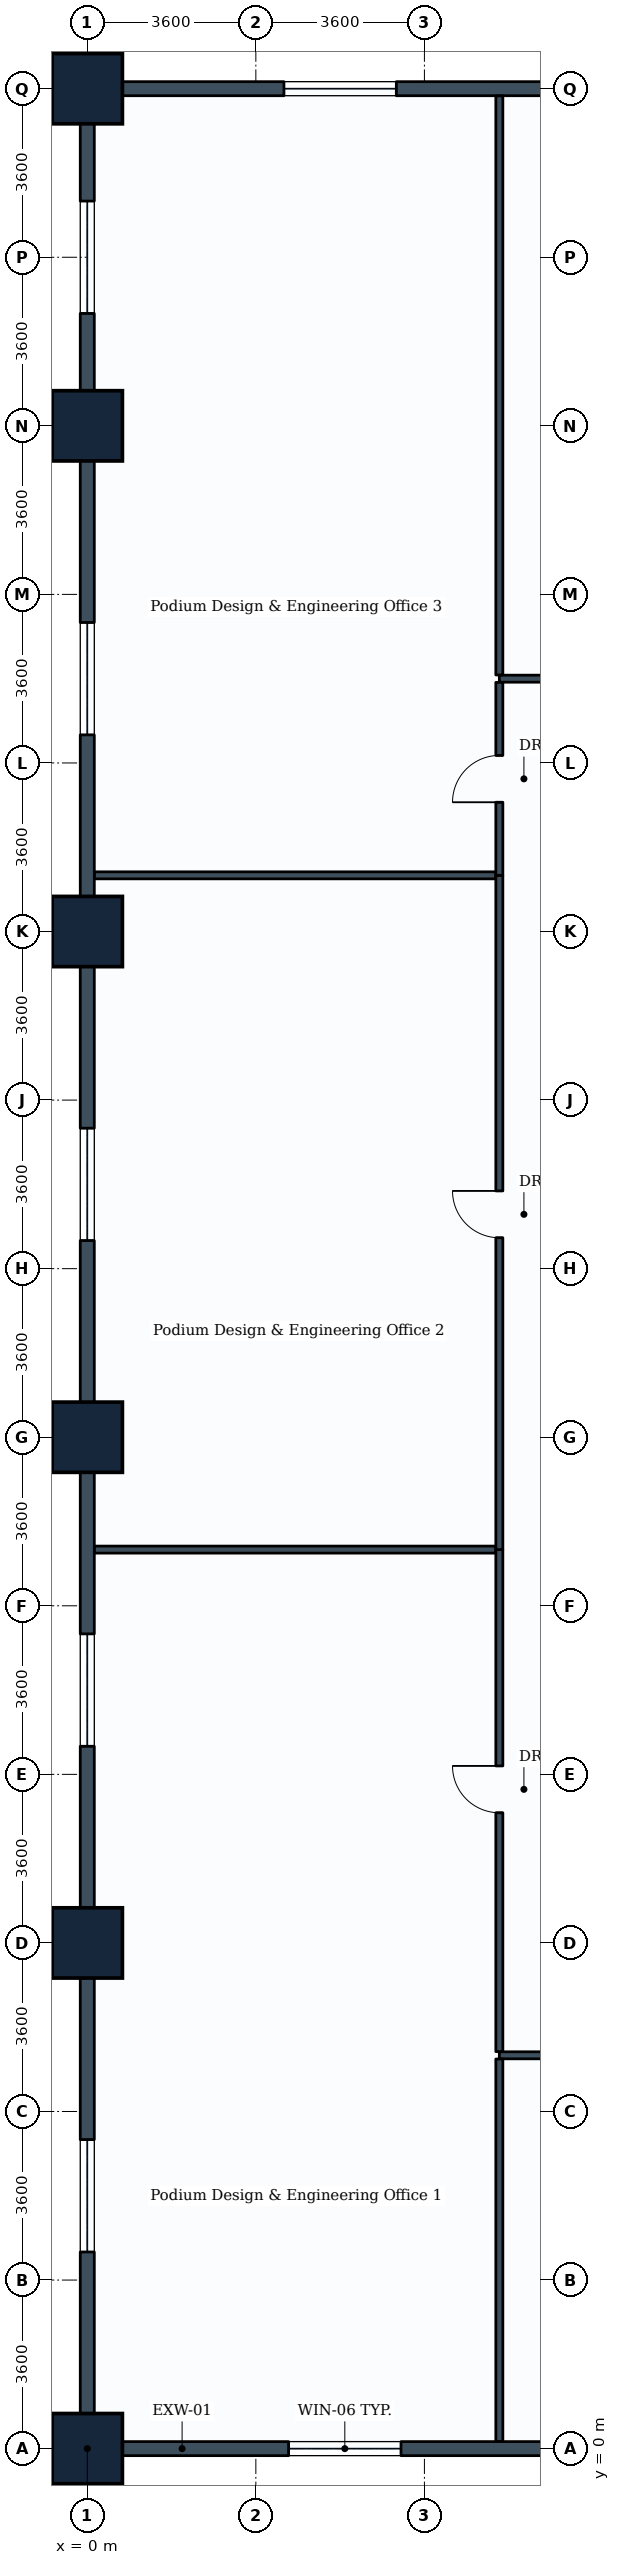
"""IFC4 building model, lengths in metres.
Left out: names, types, materials, properties, quantities, classifications, styles, units other than length and angle.
Written with IfcOpenShell. Run it as: python <this file> out.ifc"""

import sys

from ifc_helpers import new_model, si_unit, direction, frame, frame_2d, origin, origin_2d, place, context, subcontext, project, spatial, rectangle, extrude, element, fill, save


model = new_model("IFC4")
c1 = context("Model", 3, precision=1e-05, world=origin(), true_north=direction((0.0, 1.0)))
c2 = subcontext(c1, "Body", "Model", "MODEL_VIEW")
j1 = project(units=[si_unit("LENGTHUNIT", "METRE"), si_unit("PLANEANGLEUNIT", "RADIAN")], contexts=[c1])
p1 = place(None, origin())
s1 = spatial("IfcSite", under=j1, at=p1, CompositionType="ELEMENT")
p2 = place(p1, origin())
s2 = spatial("IfcBuilding", under=s1, at=p2, CompositionType="ELEMENT")
p3 = place(p2, frame((0.0, 0.0, 10.2)))
s3 = spatial("IfcBuildingStorey", under=s2, at=p3, CompositionType="ELEMENT", Elevation=10.2)
for number, where, z_axis, x_axis in (
    (1, (0.0, 0.0, 0.0), (0.0, 0.0, 1.0), (1.0, 0.0, 0.0)),
    (2, (0.0, 10.8, 0.0), (0.0, 0.0, 1.0), (1.0, 0.0, 0.0)),
    (3, (0.0, 21.6, 0.0), (0.0, 0.0, 1.0), (1.0, 0.0, 0.0)),
    (4, (0.0, 32.4, 0.0), (0.0, 0.0, 1.0), (1.0, 0.0, 0.0)),
    (5, (0.0, 43.2, 0.0), (0.0, 0.0, 1.0), (1.0, 0.0, 0.0)),
    (6, (0.0, 50.4, 0.0), (0.0, 0.0, 1.0), (1.0, 0.0, 0.0)),
):
    element("IfcColumn", number, at=place(p3, frame(where, z_axis=z_axis, x_axis=x_axis)), inside=s3, PredefinedType="COLUMN", context=c2, shape_type="SweptSolid", body=[
        extrude(rectangle(XDim=1.5, YDim=1.5, at=origin_2d()), origin(), (0.0, 0.0, 1.0), 4.6),
    ])
p4 = place(p3, frame((10.8, 0.0, 0.0), z_axis=(0.0, 0.0, 1.0), x_axis=(-1.0, 0.0, 0.0)))
e7 = element("IfcWall", 7, at=p4, inside=s3, PredefinedType="STANDARD", context=c2, shape_type="SweptSolid", body=[
    extrude(rectangle(XDim=10.8, YDim=0.3, at=frame_2d((5.4, 0.0))), origin(), (0.0, 0.0, 1.0), 3.23),
])
p5 = place(p4, frame((4.1, 0.0, 0.85)))
e8 = element("IfcOpeningElement", 8, at=p5, cuts=e7, PredefinedType="OPENING", context=c2, shape_type="SweptSolid", body=[
    extrude(rectangle(XDim=2.4, YDim=1.6, at=frame_2d((1.2, 0.8))), frame((0.0, 0.16, 0.0), z_axis=(0.0, -1.0, 0.0), x_axis=(1.0, 0.0, 0.0)), (0.0, 0.0, 1.0), 0.32),
])
p6 = place(p3, frame((0.0, 50.4, 0.0), z_axis=(0.0, 0.0, 1.0), x_axis=(1.0, 0.0, 0.0)))
e9 = element("IfcWall", 9, at=p6, inside=s3, PredefinedType="STANDARD", context=c2, shape_type="SweptSolid", body=[
    extrude(rectangle(XDim=10.8, YDim=0.3, at=frame_2d((5.4, 0.0))), origin(), (0.0, 0.0, 1.0), 3.63),
])
p7 = place(p6, frame((4.2, 0.0, 0.85)))
e10 = element("IfcOpeningElement", 10, at=p7, cuts=e9, PredefinedType="OPENING", context=c2, shape_type="SweptSolid", body=[
    extrude(rectangle(XDim=2.4, YDim=1.6, at=frame_2d((1.2, 0.8))), frame((0.0, 0.16, 0.0), z_axis=(0.0, -1.0, 0.0), x_axis=(1.0, 0.0, 0.0)), (0.0, 0.0, 1.0), 0.32),
])
p8 = place(p3, frame((0.0, 0.0, 0.0), z_axis=(0.0, 0.0, 1.0), x_axis=(0.0, 1.0, 0.0)))
e11 = element("IfcWall", 11, at=p8, inside=s3, PredefinedType="STANDARD", context=c2, shape_type="SweptSolid", body=[
    extrude(rectangle(XDim=10.8, YDim=0.3, at=frame_2d((5.4, 0.0))), origin(), (0.0, 0.0, 1.0), 3.23),
])
p9 = place(p8, frame((4.2, 0.0, 0.85)))
e12 = element("IfcOpeningElement", 12, at=p9, cuts=e11, PredefinedType="OPENING", context=c2, shape_type="SweptSolid", body=[
    extrude(rectangle(XDim=2.4, YDim=1.6, at=frame_2d((1.2, 0.8))), frame((0.0, 0.16, 0.0), z_axis=(0.0, -1.0, 0.0), x_axis=(1.0, 0.0, 0.0)), (0.0, 0.0, 1.0), 0.32),
])
p10 = place(p3, frame((0.0, 10.8, 0.0), z_axis=(0.0, 0.0, 1.0), x_axis=(0.0, 1.0, 0.0)))
e13 = element("IfcWall", 13, at=p10, inside=s3, PredefinedType="STANDARD", context=c2, shape_type="SweptSolid", body=[
    extrude(rectangle(XDim=10.8, YDim=0.3, at=frame_2d((5.4, 0.0))), origin(), (0.0, 0.0, 1.0), 3.63),
])
p11 = place(p10, frame((4.2, 0.0, 0.85)))
e14 = element("IfcOpeningElement", 14, at=p11, cuts=e13, PredefinedType="OPENING", context=c2, shape_type="SweptSolid", body=[
    extrude(rectangle(XDim=2.4, YDim=1.6, at=frame_2d((1.2, 0.8))), frame((0.0, 0.16, 0.0), z_axis=(0.0, -1.0, 0.0), x_axis=(1.0, 0.0, 0.0)), (0.0, 0.0, 1.0), 0.32),
])
p12 = place(p3, frame((0.0, 21.6, 0.0), z_axis=(0.0, 0.0, 1.0), x_axis=(0.0, 1.0, 0.0)))
e15 = element("IfcWall", 15, at=p12, inside=s3, PredefinedType="STANDARD", context=c2, shape_type="SweptSolid", body=[
    extrude(rectangle(XDim=10.8, YDim=0.3, at=frame_2d((5.4, 0.0))), origin(), (0.0, 0.0, 1.0), 3.63),
])
p13 = place(p12, frame((4.2, 0.0, 0.85)))
e16 = element("IfcOpeningElement", 16, at=p13, cuts=e15, PredefinedType="OPENING", context=c2, shape_type="SweptSolid", body=[
    extrude(rectangle(XDim=2.4, YDim=1.6, at=frame_2d((1.2, 0.8))), frame((0.0, 0.16, 0.0), z_axis=(0.0, -1.0, 0.0), x_axis=(1.0, 0.0, 0.0)), (0.0, 0.0, 1.0), 0.32),
])
p14 = place(p3, frame((0.0, 32.4, 0.0), z_axis=(0.0, 0.0, 1.0), x_axis=(0.0, 1.0, 0.0)))
e17 = element("IfcWall", 17, at=p14, inside=s3, PredefinedType="STANDARD", context=c2, shape_type="SweptSolid", body=[
    extrude(rectangle(XDim=10.8, YDim=0.3, at=frame_2d((5.4, 0.0))), origin(), (0.0, 0.0, 1.0), 3.63),
])
p15 = place(p14, frame((4.2, 0.0, 0.85)))
e18 = element("IfcOpeningElement", 18, at=p15, cuts=e17, PredefinedType="OPENING", context=c2, shape_type="SweptSolid", body=[
    extrude(rectangle(XDim=2.4, YDim=1.6, at=frame_2d((1.2, 0.8))), frame((0.0, 0.16, 0.0), z_axis=(0.0, -1.0, 0.0), x_axis=(1.0, 0.0, 0.0)), (0.0, 0.0, 1.0), 0.32),
])
p16 = place(p3, frame((0.0, 43.2, 0.0), z_axis=(0.0, 0.0, 1.0), x_axis=(0.0, 1.0, 0.0)))
e19 = element("IfcWall", 19, at=p16, inside=s3, PredefinedType="STANDARD", context=c2, shape_type="SweptSolid", body=[
    extrude(rectangle(XDim=7.2, YDim=0.3, at=frame_2d((3.6, 0.0))), origin(), (0.0, 0.0, 1.0), 3.63),
])
p17 = place(p16, frame((2.4, 0.0, 0.85)))
e20 = element("IfcOpeningElement", 20, at=p17, cuts=e19, PredefinedType="OPENING", context=c2, shape_type="SweptSolid", body=[
    extrude(rectangle(XDim=2.4, YDim=1.6, at=frame_2d((1.2, 0.8))), frame((0.0, 0.16, 0.0), z_axis=(0.0, -1.0, 0.0), x_axis=(1.0, 0.0, 0.0)), (0.0, 0.0, 1.0), 0.32),
])
p18 = place(p3, frame((8.8, 8.4, 0.0), z_axis=(0.0, 0.0, 1.0), x_axis=(1.0, 0.0, 0.0)))
e21 = element("IfcWall", 21, at=p18, inside=s3, PredefinedType="PARTITIONING", context=c2, shape_type="SweptSolid", body=[
    extrude(rectangle(XDim=17.6, YDim=0.15, at=frame_2d((8.8, 0.0))), origin(), (0.0, 0.0, 1.0), 3.23),
])
p19 = place(p18, frame((7.96, 0.0, 0.0)))
e22 = element("IfcOpeningElement", 22, at=p19, cuts=e21, PredefinedType="OPENING", context=c2, shape_type="SweptSolid", body=[
    extrude(rectangle(XDim=1.6, YDim=2.2, at=frame_2d((0.8, 1.1))), frame((0.0, 0.085, 0.0), z_axis=(0.0, -1.0, 0.0), x_axis=(1.0, 0.0, 0.0)), (0.0, 0.0, 1.0), 0.17),
])
p20 = place(p3, frame((8.8, 37.8, 0.0), z_axis=(0.0, 0.0, 1.0), x_axis=(1.0, 0.0, 0.0)))
e23 = element("IfcWall", 23, at=p20, inside=s3, PredefinedType="PARTITIONING", context=c2, shape_type="SweptSolid", body=[
    extrude(rectangle(XDim=20.0, YDim=0.15, at=frame_2d((10.0, 0.0))), origin(), (0.0, 0.0, 1.0), 3.63),
])
p21 = place(p20, frame((9.16, 0.0, 0.0)))
e24 = element("IfcOpeningElement", 24, at=p21, cuts=e23, PredefinedType="OPENING", context=c2, shape_type="SweptSolid", body=[
    extrude(rectangle(XDim=1.6, YDim=2.2, at=frame_2d((0.8, 1.1))), frame((0.0, 0.085, 0.0), z_axis=(0.0, -1.0, 0.0), x_axis=(1.0, 0.0, 0.0)), (0.0, 0.0, 1.0), 0.17),
])
p22 = place(p3, frame((8.8, 0.154, 0.0), z_axis=(0.0, 0.0, 1.0), x_axis=(0.0, 1.0, 0.0)))
e25 = element("IfcWall", 25, at=p22, inside=s3, PredefinedType="PARTITIONING", context=c2, shape_type="SweptSolid", body=[
    extrude(rectangle(XDim=8.167, YDim=0.15, at=frame_2d((4.083, 0.0))), origin(), (0.0, 0.0, 1.0), 4.285),
])
p23 = place(p3, frame((8.8, 8.479, 0.0), z_axis=(0.0, 0.0, 1.0), x_axis=(0.0, 1.0, 0.0)))
e26 = element("IfcWall", 26, at=p23, inside=s3, PredefinedType="PARTITIONING", context=c2, shape_type="SweptSolid", body=[
    extrude(rectangle(XDim=10.721, YDim=0.15, at=frame_2d((5.36, 0.0))), origin(), (0.0, 0.0, 1.0), 3.63),
])
p24 = place(p23, frame((5.101, 0.0, 0.0)))
e27 = element("IfcOpeningElement", 27, at=p24, cuts=e26, PredefinedType="OPENING", context=c2, shape_type="SweptSolid", body=[
    extrude(rectangle(XDim=1.0, YDim=2.1, at=frame_2d((0.5, 1.05))), frame((0.0, 0.085, 0.0), z_axis=(0.0, -1.0, 0.0), x_axis=(1.0, 0.0, 0.0)), (0.0, 0.0, 1.0), 0.17),
])
p25 = place(p3, frame((0.154, 19.2, 0.0), z_axis=(0.0, 0.0, 1.0), x_axis=(1.0, 0.0, 0.0)))
e28 = element("IfcWall", 28, at=p25, inside=s3, PredefinedType="PARTITIONING", context=c2, shape_type="SweptSolid", body=[
    extrude(rectangle(XDim=8.567, YDim=0.15, at=frame_2d((4.283, 0.0))), origin(), (0.0, 0.0, 1.0), 3.83),
])
p26 = place(p3, frame((8.8, 19.2, 0.0), z_axis=(0.0, 0.0, 1.0), x_axis=(0.0, 1.0, 0.0)))
e29 = element("IfcWall", 29, at=p26, inside=s3, PredefinedType="PARTITIONING", context=c2, shape_type="SweptSolid", body=[
    extrude(rectangle(XDim=14.4, YDim=0.15, at=frame_2d((7.2, 0.0))), origin(), (0.0, 0.0, 1.0), 3.63),
])
p27 = place(p26, frame((6.66, 0.0, 0.0)))
e30 = element("IfcOpeningElement", 30, at=p27, cuts=e29, PredefinedType="OPENING", context=c2, shape_type="SweptSolid", body=[
    extrude(rectangle(XDim=1.0, YDim=2.1, at=frame_2d((0.5, 1.05))), frame((0.0, 0.085, 0.0), z_axis=(0.0, -1.0, 0.0), x_axis=(1.0, 0.0, 0.0)), (0.0, 0.0, 1.0), 0.17),
])
p28 = place(p3, frame((0.154, 33.6, 0.0), z_axis=(0.0, 0.0, 1.0), x_axis=(1.0, 0.0, 0.0)))
e31 = element("IfcWall", 31, at=p28, inside=s3, PredefinedType="PARTITIONING", context=c2, shape_type="SweptSolid", body=[
    extrude(rectangle(XDim=8.567, YDim=0.15, at=frame_2d((4.283, 0.0))), origin(), (0.0, 0.0, 1.0), 3.83),
])
p29 = place(p3, frame((8.8, 33.6, 0.0), z_axis=(0.0, 0.0, 1.0), x_axis=(0.0, 1.0, 0.0)))
e32 = element("IfcWall", 32, at=p29, inside=s3, PredefinedType="PARTITIONING", context=c2, shape_type="SweptSolid", body=[
    extrude(rectangle(XDim=4.121, YDim=0.15, at=frame_2d((2.061, 0.0))), origin(), (0.0, 0.0, 1.0), 4.285),
])
p30 = place(p29, frame((1.561, 0.0, 0.0)))
e33 = element("IfcOpeningElement", 33, at=p30, cuts=e32, PredefinedType="OPENING", context=c2, shape_type="SweptSolid", body=[
    extrude(rectangle(XDim=1.0, YDim=2.1, at=frame_2d((0.5, 1.05))), frame((0.0, 0.085, 0.0), z_axis=(0.0, -1.0, 0.0), x_axis=(1.0, 0.0, 0.0)), (0.0, 0.0, 1.0), 0.17),
])
p31 = place(p3, frame((8.8, 37.879, 0.0), z_axis=(0.0, 0.0, 1.0), x_axis=(0.0, 1.0, 0.0)))
e34 = element("IfcWall", 34, at=p31, inside=s3, PredefinedType="PARTITIONING", context=c2, shape_type="SweptSolid", body=[
    extrude(rectangle(XDim=12.367, YDim=0.15, at=frame_2d((6.184, 0.0))), origin(), (0.0, 0.0, 1.0), 3.63),
])
p32 = place(p5, origin())
e35 = element("IfcWindow", 35, at=p32, inside=s3, PartitioningType="SINGLE_PANEL", PredefinedType="WINDOW", context=c2, shape_type="SweptSolid", body=[
    extrude(rectangle(XDim=2.4, YDim=1.6, at=frame_2d((1.2, 0.8))), frame((0.0, 0.03, 0.0), z_axis=(0.0, -1.0, 0.0), x_axis=(1.0, 0.0, 0.0)), (0.0, 0.0, 1.0), 0.06),
])
fill(e8, e35)
p33 = place(p7, origin())
e36 = element("IfcWindow", 36, at=p33, inside=s3, PartitioningType="SINGLE_PANEL", PredefinedType="WINDOW", context=c2, shape_type="SweptSolid", body=[
    extrude(rectangle(XDim=2.4, YDim=1.6, at=frame_2d((1.2, 0.8))), frame((0.0, 0.03, 0.0), z_axis=(0.0, -1.0, 0.0), x_axis=(1.0, 0.0, 0.0)), (0.0, 0.0, 1.0), 0.06),
])
fill(e10, e36)
p34 = place(p9, origin())
e37 = element("IfcWindow", 37, at=p34, inside=s3, PartitioningType="SINGLE_PANEL", PredefinedType="WINDOW", context=c2, shape_type="SweptSolid", body=[
    extrude(rectangle(XDim=2.4, YDim=1.6, at=frame_2d((1.2, 0.8))), frame((0.0, 0.03, 0.0), z_axis=(0.0, -1.0, 0.0), x_axis=(1.0, 0.0, 0.0)), (0.0, 0.0, 1.0), 0.06),
])
fill(e12, e37)
p35 = place(p11, origin())
e38 = element("IfcWindow", 38, at=p35, inside=s3, PartitioningType="SINGLE_PANEL", PredefinedType="WINDOW", context=c2, shape_type="SweptSolid", body=[
    extrude(rectangle(XDim=2.4, YDim=1.6, at=frame_2d((1.2, 0.8))), frame((0.0, 0.03, 0.0), z_axis=(0.0, -1.0, 0.0), x_axis=(1.0, 0.0, 0.0)), (0.0, 0.0, 1.0), 0.06),
])
fill(e14, e38)
p36 = place(p13, origin())
e39 = element("IfcWindow", 39, at=p36, inside=s3, PartitioningType="SINGLE_PANEL", PredefinedType="WINDOW", context=c2, shape_type="SweptSolid", body=[
    extrude(rectangle(XDim=2.4, YDim=1.6, at=frame_2d((1.2, 0.8))), frame((0.0, 0.03, 0.0), z_axis=(0.0, -1.0, 0.0), x_axis=(1.0, 0.0, 0.0)), (0.0, 0.0, 1.0), 0.06),
])
fill(e16, e39)
p37 = place(p15, origin())
e40 = element("IfcWindow", 40, at=p37, inside=s3, PartitioningType="SINGLE_PANEL", PredefinedType="WINDOW", context=c2, shape_type="SweptSolid", body=[
    extrude(rectangle(XDim=2.4, YDim=1.6, at=frame_2d((1.2, 0.8))), frame((0.0, 0.03, 0.0), z_axis=(0.0, -1.0, 0.0), x_axis=(1.0, 0.0, 0.0)), (0.0, 0.0, 1.0), 0.06),
])
fill(e18, e40)
p38 = place(p17, origin())
e41 = element("IfcWindow", 41, at=p38, inside=s3, PartitioningType="SINGLE_PANEL", PredefinedType="WINDOW", context=c2, shape_type="SweptSolid", body=[
    extrude(rectangle(XDim=2.4, YDim=1.6, at=frame_2d((1.2, 0.8))), frame((0.0, 0.03, 0.0), z_axis=(0.0, -1.0, 0.0), x_axis=(1.0, 0.0, 0.0)), (0.0, 0.0, 1.0), 0.06),
])
fill(e20, e41)
p39 = place(p24, origin())
e42 = element("IfcDoor", 42, at=p39, inside=s3, OperationType="SINGLE_SWING_RIGHT", PredefinedType="DOOR", context=c2, shape_type="SweptSolid", body=[
    extrude(rectangle(XDim=1.0, YDim=2.1, at=frame_2d((0.5, 1.05))), frame((0.0, 0.025, 0.0), z_axis=(0.0, -1.0, 0.0), x_axis=(1.0, 0.0, 0.0)), (0.0, 0.0, 1.0), 0.05),
])
fill(e27, e42)
p40 = place(p27, origin())
e43 = element("IfcDoor", 43, at=p40, inside=s3, OperationType="SINGLE_SWING_RIGHT", PredefinedType="DOOR", context=c2, shape_type="SweptSolid", body=[
    extrude(rectangle(XDim=1.0, YDim=2.1, at=frame_2d((0.5, 1.05))), frame((0.0, 0.025, 0.0), z_axis=(0.0, -1.0, 0.0), x_axis=(1.0, 0.0, 0.0)), (0.0, 0.0, 1.0), 0.05),
])
fill(e30, e43)
p41 = place(p30, origin())
e44 = element("IfcDoor", 44, at=p41, inside=s3, OperationType="SINGLE_SWING_LEFT", PredefinedType="DOOR", context=c2, shape_type="SweptSolid", body=[
    extrude(rectangle(XDim=1.0, YDim=2.1, at=frame_2d((0.5, 1.05))), frame((0.0, 0.025, 0.0), z_axis=(0.0, -1.0, 0.0), x_axis=(1.0, 0.0, 0.0)), (0.0, 0.0, 1.0), 0.05),
])
fill(e33, e44)
save(model, sys.argv[1])
